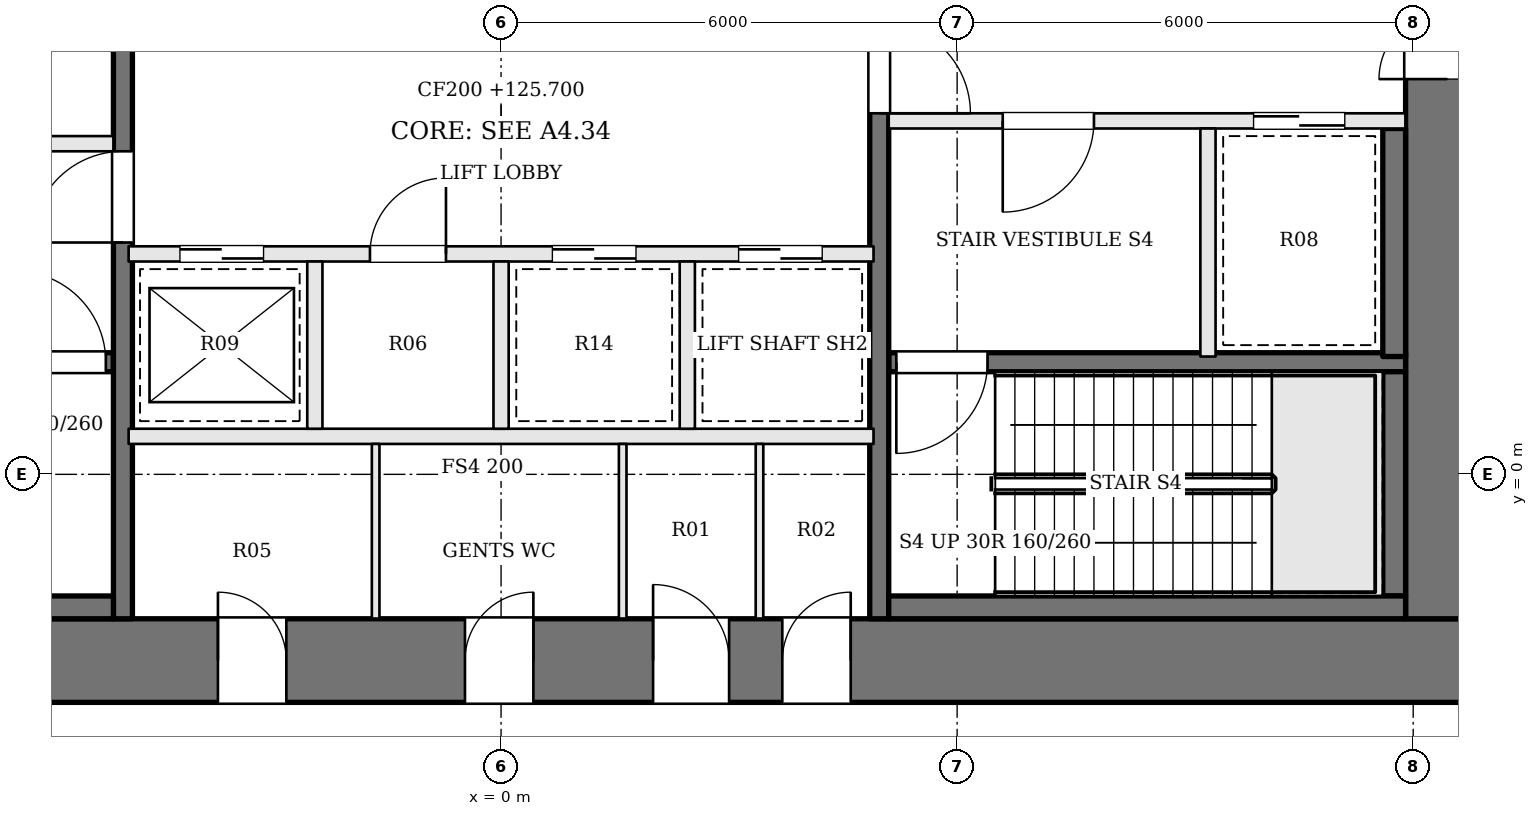
"""IFC4 building model, lengths in metres.
Left out: names, types, materials, properties, quantities, classifications, styles, units other than length and angle.
Written with IfcOpenShell. Run it as: python <this file> out.ifc"""

import sys

from ifc_helpers import new_model, si_unit, direction, frame, frame_2d, origin, place, context, subcontext, project, spatial, rectangle, extrude, element, fill, save


model = new_model("IFC4")
c1 = context("Model", 3, precision=1e-05, world=origin(), true_north=direction((0.0, 1.0)))
c2 = subcontext(c1, "Body", "Model", "MODEL_VIEW")
j1 = project(units=[si_unit("LENGTHUNIT", "METRE"), si_unit("PLANEANGLEUNIT", "RADIAN")], contexts=[c1])
p1 = place(None, origin())
s1 = spatial("IfcSite", under=j1, at=p1, CompositionType="ELEMENT")
p2 = place(p1, origin())
s2 = spatial("IfcBuilding", under=s1, at=p2, CompositionType="ELEMENT")
p3 = place(p2, frame((0.0, 0.0, 125.7)))
s3 = spatial("IfcBuildingStorey", under=s2, at=p3, CompositionType="ELEMENT", Elevation=125.7)
p4 = place(p3, frame((-13.0, -2.45, 0.0), z_axis=(0.0, 0.0, 1.0), x_axis=(1.0, 0.0, 0.0)))
e1 = element("IfcWall", 1, at=p4, inside=s3, PredefinedType="SHEAR", context=c2, shape_type="SweptSolid", body=[
    extrude(rectangle(XDim=26.0, YDim=1.1, at=frame_2d((13.0, 0.0))), origin(), (0.0, 0.0, 1.0), 4.8),
])
p5 = place(p4, frame((9.275, 0.0, 0.0)))
e2 = element("IfcOpeningElement", 2, at=p5, cuts=e1, PredefinedType="OPENING", context=c2, shape_type="SweptSolid", body=[
    extrude(rectangle(XDim=0.9, YDim=2.1, at=frame_2d((0.45, 1.05))), frame((0.0, 0.56, 0.0), z_axis=(0.0, -1.0, 0.0), x_axis=(1.0, 0.0, 0.0)), (0.0, 0.0, 1.0), 1.12),
])
p6 = place(p4, frame((12.525, 0.0, 0.0)))
e3 = element("IfcOpeningElement", 3, at=p6, cuts=e1, PredefinedType="OPENING", context=c2, shape_type="SweptSolid", body=[
    extrude(rectangle(XDim=0.9, YDim=2.1, at=frame_2d((0.45, 1.05))), frame((0.0, 0.56, 0.0), z_axis=(0.0, -1.0, 0.0), x_axis=(1.0, 0.0, 0.0)), (0.0, 0.0, 1.0), 1.12),
])
p7 = place(p4, frame((15.0, 0.0, 0.0)))
e4 = element("IfcOpeningElement", 4, at=p7, cuts=e1, PredefinedType="OPENING", context=c2, shape_type="SweptSolid", body=[
    extrude(rectangle(XDim=1.0, YDim=2.1, at=frame_2d((0.5, 1.05))), frame((0.0, 0.56, 0.0), z_axis=(0.0, -1.0, 0.0), x_axis=(1.0, 0.0, 0.0)), (0.0, 0.0, 1.0), 1.12),
])
p8 = place(p4, frame((16.7, 0.0, 0.0)))
e5 = element("IfcOpeningElement", 5, at=p8, cuts=e1, PredefinedType="OPENING", context=c2, shape_type="SweptSolid", body=[
    extrude(rectangle(XDim=0.9, YDim=2.1, at=frame_2d((0.45, 1.05))), frame((0.0, 0.56, 0.0), z_axis=(0.0, -1.0, 0.0), x_axis=(1.0, 0.0, 0.0)), (0.0, 0.0, 1.0), 1.12),
])
p9 = place(p3, frame((12.45, -1.9, 0.0), z_axis=(0.0, 0.0, 1.0), x_axis=(0.0, 1.0, 0.0)))
e6 = element("IfcWall", 6, at=p9, inside=s3, PredefinedType="SHEAR", context=c2, shape_type="SweptSolid", body=[
    extrude(rectangle(XDim=12.8, YDim=1.1, at=frame_2d((6.4, 0.0))), origin(), (0.0, 0.0, 1.0), 4.8),
])
p10 = place(p9, frame((7.1, 0.0, 0.0)))
e7 = element("IfcOpeningElement", 7, at=p10, cuts=e6, PredefinedType="OPENING", context=c2, shape_type="SweptSolid", body=[
    extrude(rectangle(XDim=1.8, YDim=2.1, at=frame_2d((0.9, 1.05))), frame((0.0, 0.56, 0.0), z_axis=(0.0, -1.0, 0.0), x_axis=(1.0, 0.0, 0.0)), (0.0, 0.0, 1.0), 1.12),
])
p11 = place(p3, frame((-11.9, 1.475, 0.0), z_axis=(0.0, 0.0, 1.0), x_axis=(1.0, 0.0, 0.0)))
e8 = element("IfcWall", 8, at=p11, inside=s3, PredefinedType="SOLIDWALL", context=c2, shape_type="SweptSolid", body=[
    extrude(rectangle(XDim=6.8, YDim=0.25, at=frame_2d((3.4, 0.0))), origin(), (0.0, 0.0, 1.0), 4.6),
])
p12 = place(p11, frame((5.5, 0.0, 0.0)))
e9 = element("IfcOpeningElement", 9, at=p12, cuts=e8, PredefinedType="OPENING", context=c2, shape_type="SweptSolid", body=[
    extrude(rectangle(XDim=1.2, YDim=2.1, at=frame_2d((0.6, 1.05))), frame((0.0, 0.135, 0.0), z_axis=(0.0, -1.0, 0.0), x_axis=(1.0, 0.0, 0.0)), (0.0, 0.0, 1.0), 0.27),
])
p13 = place(p3, frame((-11.9, 4.35, 0.0), z_axis=(0.0, 0.0, 1.0), x_axis=(1.0, 0.0, 0.0)))
e10 = element("IfcWall", 10, at=p13, inside=s3, PredefinedType="SOLIDWALL", context=c2, shape_type="SweptSolid", body=[
    extrude(rectangle(XDim=6.8, YDim=0.2, at=frame_2d((3.4, 0.0))), origin(), (0.0, 0.0, 1.0), 4.6),
])
p14 = place(p13, frame((4.1, 0.0, 0.0)))
e11 = element("IfcOpeningElement", 11, at=p14, cuts=e10, PredefinedType="OPENING", context=c2, shape_type="SweptSolid", body=[
    extrude(rectangle(XDim=1.2, YDim=2.1, at=frame_2d((0.6, 1.05))), frame((0.0, 0.11, 0.0), z_axis=(0.0, -1.0, 0.0), x_axis=(1.0, 0.0, 0.0)), (0.0, 0.0, 1.0), 0.22),
])
p15 = place(p13, frame((0.8, 0.0, 0.0)))
e12 = element("IfcOpeningElement", 12, at=p15, cuts=e10, PredefinedType="OPENING", context=c2, shape_type="SweptSolid", body=[
    extrude(rectangle(XDim=1.2, YDim=2.1, at=frame_2d((0.6, 1.05))), frame((0.0, 0.11, 0.0), z_axis=(0.0, -1.0, 0.0), x_axis=(1.0, 0.0, 0.0)), (0.0, 0.0, 1.0), 0.22),
])
p16 = place(p3, frame((11.9, 4.65, 0.0), z_axis=(0.0, 0.0, 1.0), x_axis=(-1.0, 0.0, 0.0)))
e13 = element("IfcWall", 13, at=p16, inside=s3, PredefinedType="SOLIDWALL", context=c2, shape_type="SweptSolid", body=[
    extrude(rectangle(XDim=6.8, YDim=0.2, at=frame_2d((3.4, 0.0))), origin(), (0.0, 0.0, 1.0), 4.6),
])
p17 = place(p16, frame((4.1, 0.0, 0.0)))
e14 = element("IfcOpeningElement", 14, at=p17, cuts=e13, PredefinedType="OPENING", context=c2, shape_type="SweptSolid", body=[
    extrude(rectangle(XDim=1.2, YDim=2.1, at=frame_2d((0.6, 1.05))), frame((0.0, 0.11, 0.0), z_axis=(0.0, -1.0, 0.0), x_axis=(1.0, 0.0, 0.0)), (0.0, 0.0, 1.0), 0.22),
])
p18 = place(p16, frame((0.8, 0.0, 0.0)))
e15 = element("IfcOpeningElement", 15, at=p18, cuts=e13, PredefinedType="OPENING", context=c2, shape_type="SweptSolid", body=[
    extrude(rectangle(XDim=1.2, YDim=2.1, at=frame_2d((0.6, 1.05))), frame((0.0, 0.11, 0.0), z_axis=(0.0, -1.0, 0.0), x_axis=(1.0, 0.0, 0.0)), (0.0, 0.0, 1.0), 0.22),
])
p19 = place(p3, frame((11.9, 1.475, 0.0), z_axis=(0.0, 0.0, 1.0), x_axis=(-1.0, 0.0, 0.0)))
e16 = element("IfcWall", 16, at=p19, inside=s3, PredefinedType="SOLIDWALL", context=c2, shape_type="SweptSolid", body=[
    extrude(rectangle(XDim=6.8, YDim=0.25, at=frame_2d((3.4, 0.0))), origin(), (0.0, 0.0, 1.0), 4.6),
])
p20 = place(p19, frame((5.5, 0.0, 0.0)))
e17 = element("IfcOpeningElement", 17, at=p20, cuts=e16, PredefinedType="OPENING", context=c2, shape_type="SweptSolid", body=[
    extrude(rectangle(XDim=1.2, YDim=2.1, at=frame_2d((0.6, 1.05))), frame((0.0, 0.135, 0.0), z_axis=(0.0, -1.0, 0.0), x_axis=(1.0, 0.0, 0.0)), (0.0, 0.0, 1.0), 0.27),
])
p21 = place(p3, frame((9.3, 4.55, 0.0), z_axis=(0.0, 0.0, 1.0), x_axis=(0.0, -1.0, 0.0)))
e18 = element("IfcWall", 18, at=p21, inside=s3, PredefinedType="SOLIDWALL", context=c2, shape_type="SweptSolid", body=[
    extrude(rectangle(XDim=3.0, YDim=0.2, at=frame_2d((1.5, 0.0))), origin(), (0.0, 0.0, 1.0), 4.6),
])
p22 = place(p3, frame((-4.975, -1.9, 0.0), z_axis=(0.0, 0.0, 1.0), x_axis=(0.0, 1.0, 0.0)))
e19 = element("IfcWall", 19, at=p22, inside=s3, PredefinedType="SOLIDWALL", context=c2, shape_type="SweptSolid", body=[
    extrude(rectangle(XDim=12.8, YDim=0.25, at=frame_2d((6.4, 0.0))), origin(), (0.0, 0.0, 1.0), 4.6),
])
p23 = place(p22, frame((4.95, 0.0, 0.0)))
e20 = element("IfcOpeningElement", 20, at=p23, cuts=e19, PredefinedType="OPENING", context=c2, shape_type="SweptSolid", body=[
    extrude(rectangle(XDim=1.2, YDim=2.1, at=frame_2d((0.6, 1.05))), frame((0.0, 0.135, 0.0), z_axis=(0.0, -1.0, 0.0), x_axis=(1.0, 0.0, 0.0)), (0.0, 0.0, 1.0), 0.27),
])
p24 = place(p3, frame((4.975, 10.9, 0.0), z_axis=(0.0, 0.0, 1.0), x_axis=(0.0, -1.0, 0.0)))
e21 = element("IfcWall", 21, at=p24, inside=s3, PredefinedType="SOLIDWALL", context=c2, shape_type="SweptSolid", body=[
    extrude(rectangle(XDim=12.8, YDim=0.25, at=frame_2d((6.4, 0.0))), origin(), (0.0, 0.0, 1.0), 4.6),
])
p25 = place(p24, frame((4.95, 0.0, 0.0)))
e22 = element("IfcOpeningElement", 22, at=p25, cuts=e21, PredefinedType="OPENING", context=c2, shape_type="SweptSolid", body=[
    extrude(rectangle(XDim=1.2, YDim=2.1, at=frame_2d((0.6, 1.05))), frame((0.0, 0.135, 0.0), z_axis=(0.0, -1.0, 0.0), x_axis=(1.0, 0.0, 0.0)), (0.0, 0.0, 1.0), 0.27),
])
p26 = place(p3, frame((-11.9, -1.75, 0.0), z_axis=(0.0, 0.0, 1.0), x_axis=(1.0, 0.0, 0.0)))
e23 = element("IfcWall", 23, at=p26, inside=s3, PredefinedType="SOLIDWALL", context=c2, shape_type="SweptSolid", body=[
    extrude(rectangle(XDim=6.8, YDim=0.3, at=frame_2d((3.4, 0.0))), origin(), (0.0, 0.0, 1.0), 4.6),
])
p27 = place(p3, frame((11.75, 4.55, 0.0), z_axis=(0.0, 0.0, 1.0), x_axis=(0.0, -1.0, 0.0)))
e24 = element("IfcWall", 24, at=p27, inside=s3, PredefinedType="SOLIDWALL", context=c2, shape_type="SweptSolid", body=[
    extrude(rectangle(XDim=3.0, YDim=0.3, at=frame_2d((1.5, 0.0))), origin(), (0.0, 0.0, 1.0), 4.6),
])
p28 = place(p3, frame((11.75, 1.35, 0.0), z_axis=(0.0, 0.0, 1.0), x_axis=(0.0, -1.0, 0.0)))
e25 = element("IfcWall", 25, at=p28, inside=s3, PredefinedType="SOLIDWALL", context=c2, shape_type="SweptSolid", body=[
    extrude(rectangle(XDim=2.95, YDim=0.3, at=frame_2d((1.475, 0.0))), origin(), (0.0, 0.0, 1.0), 4.6),
])
p29 = place(p3, frame((11.9, -1.75, 0.0), z_axis=(0.0, 0.0, 1.0), x_axis=(-1.0, 0.0, 0.0)))
e26 = element("IfcWall", 26, at=p29, inside=s3, PredefinedType="SOLIDWALL", context=c2, shape_type="SweptSolid", body=[
    extrude(rectangle(XDim=6.8, YDim=0.3, at=frame_2d((3.4, 0.0))), origin(), (0.0, 0.0, 1.0), 4.6),
])
p30 = place(p3, frame((-4.9, 0.5, 0.0), z_axis=(0.0, 0.0, 1.0), x_axis=(1.0, 0.0, 0.0)))
e27 = element("IfcWall", 27, at=p30, inside=s3, PredefinedType="SOLIDWALL", context=c2, shape_type="SweptSolid", body=[
    extrude(rectangle(XDim=9.8, YDim=0.2, at=frame_2d((4.9, 0.0))), origin(), (0.0, 0.0, 1.0), 4.6),
])
p31 = place(p3, frame((-4.9, 2.9, 0.0), z_axis=(0.0, 0.0, 1.0), x_axis=(1.0, 0.0, 0.0)))
e28 = element("IfcWall", 28, at=p31, inside=s3, PredefinedType="SOLIDWALL", context=c2, shape_type="SweptSolid", body=[
    extrude(rectangle(XDim=9.8, YDim=0.2, at=frame_2d((4.9, 0.0))), origin(), (0.0, 0.0, 1.0), 4.6),
])
p32 = place(p31, frame((0.675, 0.0, 0.0)))
e29 = element("IfcOpeningElement", 29, at=p32, cuts=e28, PredefinedType="OPENING", context=c2, shape_type="SweptSolid", body=[
    extrude(rectangle(XDim=1.1, YDim=2.1, at=frame_2d((0.55, 1.05))), frame((0.0, 0.11, 0.0), z_axis=(0.0, -1.0, 0.0), x_axis=(1.0, 0.0, 0.0)), (0.0, 0.0, 1.0), 0.22),
])
p33 = place(p31, frame((3.175, 0.0, 0.0)))
e30 = element("IfcOpeningElement", 30, at=p33, cuts=e28, PredefinedType="OPENING", context=c2, shape_type="SweptSolid", body=[
    extrude(rectangle(XDim=1.0, YDim=2.1, at=frame_2d((0.5, 1.05))), frame((0.0, 0.11, 0.0), z_axis=(0.0, -1.0, 0.0), x_axis=(1.0, 0.0, 0.0)), (0.0, 0.0, 1.0), 0.22),
])
p34 = place(p31, frame((5.575, 0.0, 0.0)))
e31 = element("IfcOpeningElement", 31, at=p34, cuts=e28, PredefinedType="OPENING", context=c2, shape_type="SweptSolid", body=[
    extrude(rectangle(XDim=1.1, YDim=2.1, at=frame_2d((0.55, 1.05))), frame((0.0, 0.11, 0.0), z_axis=(0.0, -1.0, 0.0), x_axis=(1.0, 0.0, 0.0)), (0.0, 0.0, 1.0), 0.22),
])
p35 = place(p31, frame((8.025, 0.0, 0.0)))
e32 = element("IfcOpeningElement", 32, at=p35, cuts=e28, PredefinedType="OPENING", context=c2, shape_type="SweptSolid", body=[
    extrude(rectangle(XDim=1.1, YDim=2.1, at=frame_2d((0.55, 1.05))), frame((0.0, 0.11, 0.0), z_axis=(0.0, -1.0, 0.0), x_axis=(1.0, 0.0, 0.0)), (0.0, 0.0, 1.0), 0.22),
])
for number, where, z_axis, x_axis in (
    (33, (-2.45, 0.6, 0.0), (0.0, 0.0, 1.0), (0.0, 1.0, 0.0)),
    (34, (0.0, 0.6, 0.0), (0.0, 0.0, 1.0), (0.0, 1.0, 0.0)),
    (35, (2.45, 0.6, 0.0), (0.0, 0.0, 1.0), (0.0, 1.0, 0.0)),
):
    element("IfcWall", number, at=place(p3, frame(where, z_axis=z_axis, x_axis=x_axis)), inside=s3, PredefinedType="SOLIDWALL", context=c2, shape_type="SweptSolid", body=[
        extrude(rectangle(XDim=2.2, YDim=0.2, at=frame_2d((1.1, 0.0))), origin(), (0.0, 0.0, 1.0), 4.6),
    ])
for number, where, z_axis, x_axis in (
    (36, (-1.65, -1.9, 0.0), (0.0, 0.0, 1.0), (0.0, 1.0, 0.0)),
    (37, (1.6, -1.9, 0.0), (0.0, 0.0, 1.0), (0.0, 1.0, 0.0)),
    (38, (3.4, -1.9, 0.0), (0.0, 0.0, 1.0), (0.0, 1.0, 0.0)),
):
    element("IfcWall", number, at=place(p3, frame(where, z_axis=z_axis, x_axis=x_axis)), inside=s3, PredefinedType="PARTITIONING", context=c2, shape_type="SweptSolid", body=[
        extrude(rectangle(XDim=2.3, YDim=0.1, at=frame_2d((1.15, 0.0))), origin(), (0.0, 0.0, 1.0), 4.6),
    ])
p36 = place(p10, origin())
e39 = element("IfcDoor", 39, at=p36, inside=s3, OperationType="DOUBLE_DOOR_SINGLE_SWING", PredefinedType="DOOR", context=c2, shape_type="SweptSolid", body=[
    extrude(rectangle(XDim=1.8, YDim=2.1, at=frame_2d((0.9, 1.05))), frame((0.0, 0.025, 0.0), z_axis=(0.0, -1.0, 0.0), x_axis=(1.0, 0.0, 0.0)), (0.0, 0.0, 1.0), 0.05),
])
fill(e7, e39)
p37 = place(p23, origin())
e40 = element("IfcDoor", 40, at=p37, inside=s3, OperationType="SINGLE_SWING_LEFT", PredefinedType="DOOR", context=c2, shape_type="SweptSolid", body=[
    extrude(rectangle(XDim=1.2, YDim=2.1, at=frame_2d((0.6, 1.05))), frame((0.0, 0.025, 0.0), z_axis=(0.0, -1.0, 0.0), x_axis=(1.0, 0.0, 0.0)), (0.0, 0.0, 1.0), 0.05),
])
fill(e20, e40)
p38 = place(p25, origin())
e41 = element("IfcDoor", 41, at=p38, inside=s3, OperationType="SINGLE_SWING_RIGHT", PredefinedType="DOOR", context=c2, shape_type="SweptSolid", body=[
    extrude(rectangle(XDim=1.2, YDim=2.1, at=frame_2d((0.6, 1.05))), frame((0.0, 0.025, 0.0), z_axis=(0.0, -1.0, 0.0), x_axis=(1.0, 0.0, 0.0)), (0.0, 0.0, 1.0), 0.05),
])
fill(e22, e41)
p39 = place(p17, origin())
e42 = element("IfcDoor", 42, at=p39, inside=s3, OperationType="SINGLE_SWING_RIGHT", PredefinedType="DOOR", context=c2, shape_type="SweptSolid", body=[
    extrude(rectangle(XDim=1.2, YDim=2.1, at=frame_2d((0.6, 1.05))), frame((0.0, 0.025, 0.0), z_axis=(0.0, -1.0, 0.0), x_axis=(1.0, 0.0, 0.0)), (0.0, 0.0, 1.0), 0.05),
])
fill(e14, e42)
p40 = place(p12, origin())
e43 = element("IfcDoor", 43, at=p40, inside=s3, OperationType="SINGLE_SWING_LEFT", PredefinedType="DOOR", context=c2, shape_type="SweptSolid", body=[
    extrude(rectangle(XDim=1.2, YDim=2.1, at=frame_2d((0.6, 1.05))), frame((0.0, 0.025, 0.0), z_axis=(0.0, -1.0, 0.0), x_axis=(1.0, 0.0, 0.0)), (0.0, 0.0, 1.0), 0.05),
])
fill(e9, e43)
p41 = place(p20, origin())
e44 = element("IfcDoor", 44, at=p41, inside=s3, OperationType="SINGLE_SWING_RIGHT", PredefinedType="DOOR", context=c2, shape_type="SweptSolid", body=[
    extrude(rectangle(XDim=1.2, YDim=2.1, at=frame_2d((0.6, 1.05))), frame((0.0, 0.025, 0.0), z_axis=(0.0, -1.0, 0.0), x_axis=(1.0, 0.0, 0.0)), (0.0, 0.0, 1.0), 0.05),
])
fill(e17, e44)
p42 = place(p18, origin())
e45 = element("IfcDoor", 45, at=p42, inside=s3, OperationType="SLIDING_TO_RIGHT", PredefinedType="DOOR", context=c2, shape_type="SweptSolid", body=[
    extrude(rectangle(XDim=1.2, YDim=2.1, at=frame_2d((0.6, 1.05))), frame((0.0, 0.025, 0.0), z_axis=(0.0, -1.0, 0.0), x_axis=(1.0, 0.0, 0.0)), (0.0, 0.0, 1.0), 0.05),
])
fill(e15, e45)
p43 = place(p32, origin())
e46 = element("IfcDoor", 46, at=p43, inside=s3, OperationType="SLIDING_TO_RIGHT", PredefinedType="DOOR", context=c2, shape_type="SweptSolid", body=[
    extrude(rectangle(XDim=1.1, YDim=2.1, at=frame_2d((0.55, 1.05))), frame((0.0, 0.025, 0.0), z_axis=(0.0, -1.0, 0.0), x_axis=(1.0, 0.0, 0.0)), (0.0, 0.0, 1.0), 0.05),
])
fill(e29, e46)
p44 = place(p33, origin())
e47 = element("IfcDoor", 47, at=p44, inside=s3, OperationType="SINGLE_SWING_RIGHT", PredefinedType="DOOR", context=c2, shape_type="SweptSolid", body=[
    extrude(rectangle(XDim=1.0, YDim=2.1, at=frame_2d((0.5, 1.05))), frame((0.0, 0.025, 0.0), z_axis=(0.0, -1.0, 0.0), x_axis=(1.0, 0.0, 0.0)), (0.0, 0.0, 1.0), 0.05),
])
fill(e30, e47)
p45 = place(p34, origin())
e48 = element("IfcDoor", 48, at=p45, inside=s3, OperationType="SLIDING_TO_LEFT", PredefinedType="DOOR", context=c2, shape_type="SweptSolid", body=[
    extrude(rectangle(XDim=1.1, YDim=2.1, at=frame_2d((0.55, 1.05))), frame((0.0, 0.025, 0.0), z_axis=(0.0, -1.0, 0.0), x_axis=(1.0, 0.0, 0.0)), (0.0, 0.0, 1.0), 0.05),
])
fill(e31, e48)
p46 = place(p35, origin())
e49 = element("IfcDoor", 49, at=p46, inside=s3, OperationType="SLIDING_TO_RIGHT", PredefinedType="DOOR", context=c2, shape_type="SweptSolid", body=[
    extrude(rectangle(XDim=1.1, YDim=2.1, at=frame_2d((0.55, 1.05))), frame((0.0, 0.025, 0.0), z_axis=(0.0, -1.0, 0.0), x_axis=(1.0, 0.0, 0.0)), (0.0, 0.0, 1.0), 0.05),
])
fill(e32, e49)
p47 = place(p5, origin())
e50 = element("IfcDoor", 50, at=p47, inside=s3, OperationType="SINGLE_SWING_LEFT", PredefinedType="DOOR", context=c2, shape_type="SweptSolid", body=[
    extrude(rectangle(XDim=0.9, YDim=2.1, at=frame_2d((0.45, 1.05))), frame((0.0, 0.025, 0.0), z_axis=(0.0, -1.0, 0.0), x_axis=(1.0, 0.0, 0.0)), (0.0, 0.0, 1.0), 0.05),
])
fill(e2, e50)
p48 = place(p6, origin())
e51 = element("IfcDoor", 51, at=p48, inside=s3, OperationType="SINGLE_SWING_RIGHT", PredefinedType="DOOR", context=c2, shape_type="SweptSolid", body=[
    extrude(rectangle(XDim=0.9, YDim=2.1, at=frame_2d((0.45, 1.05))), frame((0.0, 0.025, 0.0), z_axis=(0.0, -1.0, 0.0), x_axis=(1.0, 0.0, 0.0)), (0.0, 0.0, 1.0), 0.05),
])
fill(e3, e51)
p49 = place(p7, origin())
e52 = element("IfcDoor", 52, at=p49, inside=s3, OperationType="SINGLE_SWING_LEFT", PredefinedType="DOOR", context=c2, shape_type="SweptSolid", body=[
    extrude(rectangle(XDim=1.0, YDim=2.1, at=frame_2d((0.5, 1.05))), frame((0.0, 0.025, 0.0), z_axis=(0.0, -1.0, 0.0), x_axis=(1.0, 0.0, 0.0)), (0.0, 0.0, 1.0), 0.05),
])
fill(e4, e52)
p50 = place(p8, origin())
e53 = element("IfcDoor", 53, at=p50, inside=s3, OperationType="SINGLE_SWING_RIGHT", PredefinedType="DOOR", context=c2, shape_type="SweptSolid", body=[
    extrude(rectangle(XDim=0.9, YDim=2.1, at=frame_2d((0.45, 1.05))), frame((0.0, 0.025, 0.0), z_axis=(0.0, -1.0, 0.0), x_axis=(1.0, 0.0, 0.0)), (0.0, 0.0, 1.0), 0.05),
])
fill(e5, e53)
save(model, sys.argv[1])
